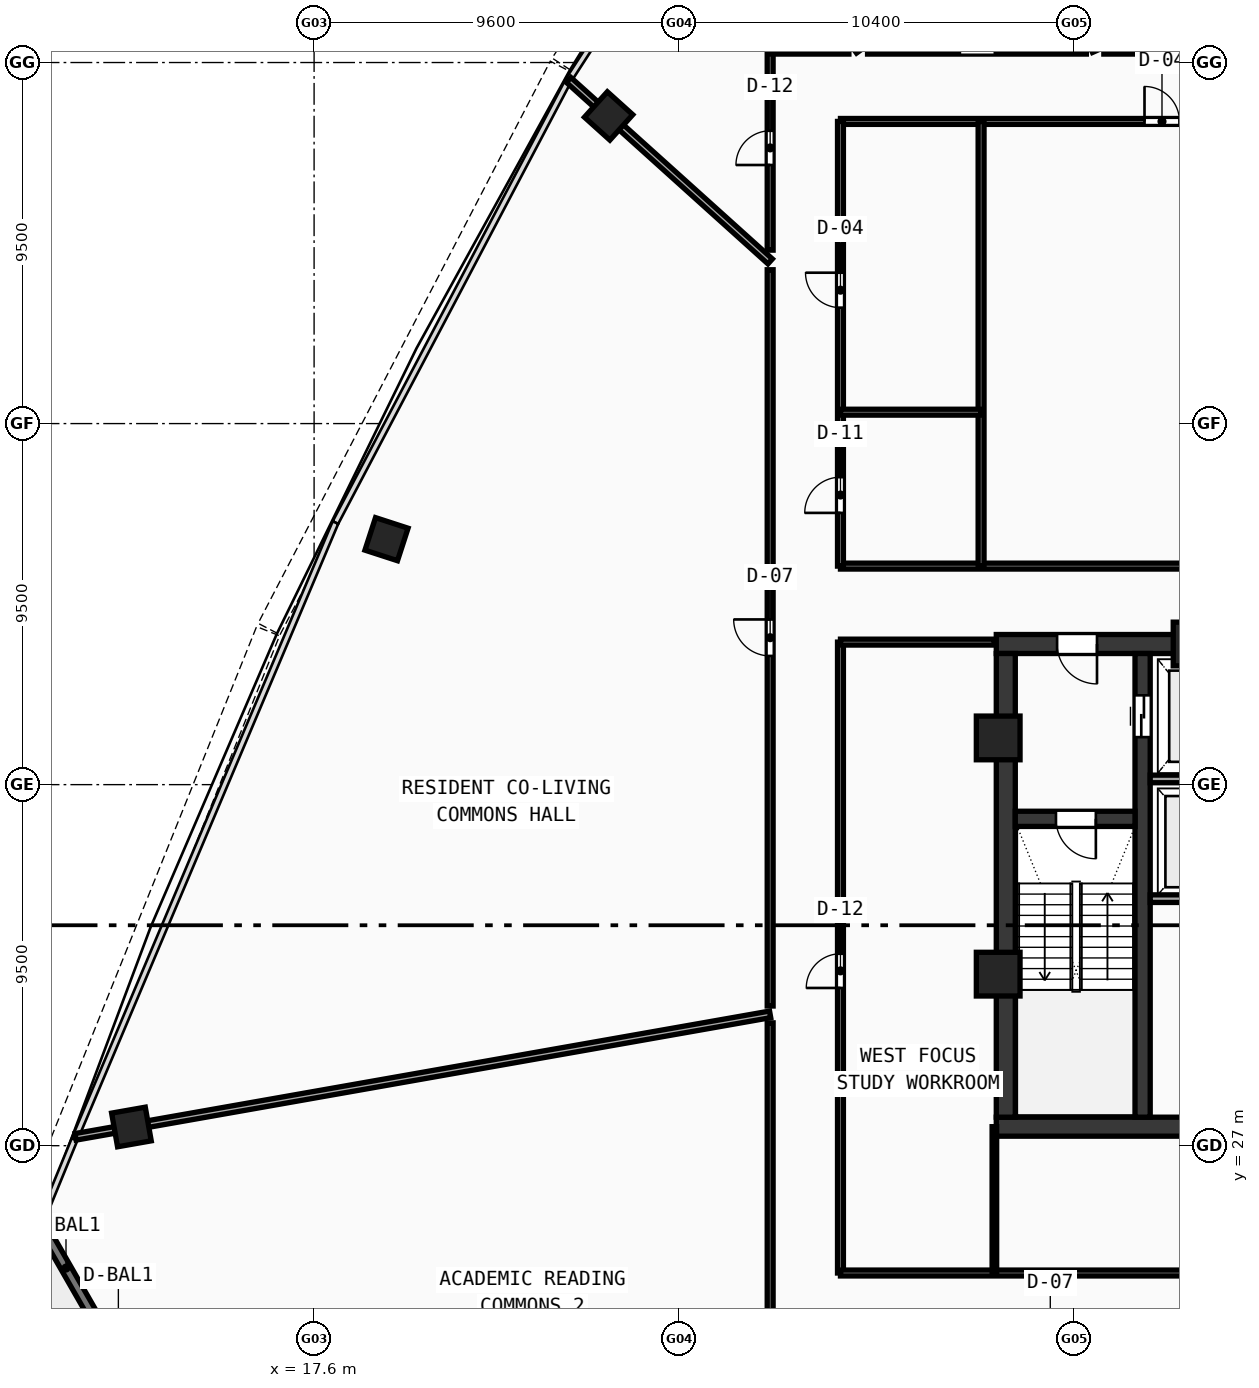
"""IFC4 building model, lengths in metres.
Left out: names, types, materials, properties, quantities, classifications, styles, units other than length and angle.
Written with IfcOpenShell. Run it as: python <this file> out.ifc"""

import sys

from ifc_helpers import new_model, si_unit, direction, frame, frame_2d, origin, origin_with_axes, origin_2d, place, context, subcontext, project, spatial, rectangle, hollow_rectangle, extrude, source, transform, mapped, element, fill, save


model = new_model("IFC4")
c1 = context("Model", 3, precision=1e-05, world=origin(), true_north=direction((0.0, 1.0)))
c2 = subcontext(c1, "Body", "Model", "MODEL_VIEW")
j1 = project(units=[si_unit("LENGTHUNIT", "METRE"), si_unit("PLANEANGLEUNIT", "RADIAN")], contexts=[c1])
p1 = place(None, origin())
s1 = spatial("IfcSite", under=j1, at=p1, CompositionType="ELEMENT")
p2 = place(p1, origin())
s2 = spatial("IfcBuilding", under=s1, at=p2, CompositionType="ELEMENT")
p3 = place(p2, frame((0.0, 0.0, 211.36)))
s3 = spatial("IfcBuildingStorey", under=s2, at=p3, CompositionType="ELEMENT", Elevation=211.36)
p4 = place(p3, frame((35.55, 27.5, 0.0), z_axis=(0.0, 0.0, 1.0), x_axis=(1.0, 0.0, 0.0)))
e1 = element("IfcWall", 1, at=p4, inside=s3, PredefinedType="SHEAR", context=c2, shape_type="SweptSolid", body=[
    extrude(rectangle(XDim=24.9, YDim=0.5, at=frame_2d((12.45, 0.0))), origin(), (0.0, 0.0, 1.0), 3.54),
])
p5 = place(p3, frame((35.55, 40.2, 0.0), z_axis=(0.0, 0.0, 1.0), x_axis=(1.0, 0.0, 0.0)))
e2 = element("IfcWall", 2, at=p5, inside=s3, PredefinedType="SHEAR", context=c2, shape_type="SweptSolid", body=[
    extrude(rectangle(XDim=11.25, YDim=0.5, at=frame_2d((5.625, 0.0))), origin(), (0.0, 0.0, 1.0), 3.54),
])
p6 = place(p5, frame((1.6, 0.0, 0.0)))
e3 = element("IfcOpeningElement", 3, at=p6, cuts=e2, PredefinedType="OPENING", context=c2, shape_type="SweptSolid", body=[
    extrude(rectangle(XDim=1.05, YDim=2.1, at=frame_2d((0.525, 1.05))), frame((0.0, 0.26, 0.0), z_axis=(0.0, -1.0, 0.0), x_axis=(1.0, 0.0, 0.0)), (0.0, 0.0, 1.0), 0.52),
])
p7 = place(p3, frame((35.8, 27.75, 0.0), z_axis=(0.0, 0.0, 1.0), x_axis=(0.0, 1.0, 0.0)))
e4 = element("IfcWall", 4, at=p7, inside=s3, PredefinedType="SHEAR", context=c2, shape_type="SweptSolid", body=[
    extrude(rectangle(XDim=12.2, YDim=0.5, at=frame_2d((6.1, 0.0))), origin(), (0.0, 0.0, 1.0), 3.54),
])
p8 = place(p3, frame((39.4, 27.75, 0.0), z_axis=(0.0, 0.0, 1.0), x_axis=(0.0, 1.0, 0.0)))
e5 = element("IfcWall", 5, at=p8, inside=s3, PredefinedType="SHEAR", context=c2, shape_type="SweptSolid", body=[
    extrude(rectangle(XDim=12.2, YDim=0.4, at=frame_2d((6.1, 0.0))), origin(), (0.0, 0.0, 1.0), 3.54),
])
p9 = place(p8, frame((10.0, 0.0, 0.0)))
e6 = element("IfcOpeningElement", 6, at=p9, cuts=e5, PredefinedType="OPENING", context=c2, shape_type="SweptSolid", body=[
    extrude(rectangle(XDim=1.1, YDim=2.1, at=frame_2d((0.55, 1.05))), frame((0.0, 0.21, 0.0), z_axis=(0.0, -1.0, 0.0), x_axis=(1.0, 0.0, 0.0)), (0.0, 0.0, 1.0), 0.42),
])
p10 = place(p3, frame((36.05, 35.6, 0.0), z_axis=(0.0, 0.0, 1.0), x_axis=(1.0, 0.0, 0.0)))
e7 = element("IfcWall", 7, at=p10, inside=s3, PredefinedType="SHEAR", context=c2, shape_type="SweptSolid", body=[
    extrude(rectangle(XDim=3.15, YDim=0.4, at=frame_2d((1.575, 0.0))), origin(), (0.0, 0.0, 1.0), 3.54),
])
p11 = place(p10, frame((1.07, 0.0, 0.0)))
e8 = element("IfcOpeningElement", 8, at=p11, cuts=e7, PredefinedType="OPENING", context=c2, shape_type="SweptSolid", body=[
    extrude(rectangle(XDim=1.05, YDim=2.1, at=frame_2d((0.525, 1.05))), frame((0.0, 0.21, 0.0), z_axis=(0.0, -1.0, 0.0), x_axis=(1.0, 0.0, 0.0)), (0.0, 0.0, 1.0), 0.42),
])
m1 = source(origin(), c2, "Body", "SweptSolid", [
    extrude(hollow_rectangle(XDim=1.15, YDim=1.15, WallThickness=0.048, at=origin_2d()), origin(), (0.0, 0.0, 1.0), 3.8),
])
for number, where, z_axis, x_axis in (
    (9, (40.781, 40.2, -0.26), (0.0, 0.0, 1.0), (1.0, 0.0, 0.0)),
    (10, (35.6, 37.729, -0.26), (0.0, 0.0, 1.0), (1.0, 0.0, 0.0)),
    (11, (35.6, 31.513, -0.26), (0.0, 0.0, 1.0), (1.0, 0.0, 0.0)),
):
    element("IfcColumn", number, at=place(p3, frame(where, z_axis=z_axis, x_axis=x_axis)), inside=s3, PredefinedType="COLUMN", context=c2, shape_type="MappedRepresentation", body=[
        mapped(m1, transform((0.0, 0.0, 0.0), scale=1.0)),
    ])
m2 = source(origin(), c2, "Body", "SweptSolid", [
    extrude(hollow_rectangle(XDim=0.9, YDim=0.9, WallThickness=0.036, at=origin_2d()), origin(), (0.0, 0.0, 1.0), 3.8),
])
for number, where, z_axis, x_axis in (
    (12, (25.349, 54.095, -0.26), (0.0, 0.0, 1.0), (-0.669, -0.743, 0.0)),
    (13, (19.505, 42.958, -0.26), (0.0, 0.0, 1.0), (-0.309, -0.951, 0.0)),
    (14, (12.793, 27.492, -0.26), (0.0, 0.0, 1.0), (0.174, -0.985, 0.0)),
):
    element("IfcColumn", number, at=place(p3, frame(where, z_axis=z_axis, x_axis=x_axis)), inside=s3, PredefinedType="COLUMN", context=c2, shape_type="MappedRepresentation", body=[
        mapped(m2, transform((0.0, 0.0, 0.0), scale=1.0)),
    ])
p12 = place(p3, frame((10.365, 25.01, 0.0), z_axis=(0.0, 0.0, 1.0), x_axis=(0.497934125263, -0.867214856249, 0.0)))
e15 = element("IfcWall", 15, at=p12, inside=s3, PredefinedType="STANDARD", context=c2, shape_type="SweptSolid", body=[
    extrude(rectangle(XDim=8.373, YDim=0.26, at=frame_2d((4.186, 0.0))), origin(), (0.0, 0.0, 1.0), 3.54),
])
p13 = place(p12, frame((3.286, 0.0, 0.0)))
e16 = element("IfcOpeningElement", 16, at=p13, cuts=e15, PredefinedType="OPENING", context=c2, shape_type="SweptSolid", body=[
    extrude(rectangle(XDim=1.8, YDim=2.15, at=frame_2d((0.9, 1.075))), frame((0.0, 0.14, 0.0), z_axis=(0.0, -1.0, 0.0), x_axis=(1.0, 0.0, 0.0)), (0.0, 0.0, 1.0), 0.28),
])
for number, where, z_axis, x_axis in (
    (17, (39.6, 36.65, 0.0), (0.0, 0.0, 1.0), (1.0, 0.0, 0.0)),
    (18, (39.6, 33.5, 0.0), (0.0, 0.0, 1.0), (1.0, 0.0, 0.0)),
):
    element("IfcWall", number, at=place(p3, frame(where, z_axis=z_axis, x_axis=x_axis)), inside=s3, PredefinedType="SOLIDWALL", context=c2, shape_type="SweptSolid", body=[
        extrude(rectangle(XDim=2.72, YDim=0.2, at=frame_2d((1.36, 0.0))), origin(), (0.0, 0.0, 1.0), 3.54),
    ])
p14 = place(p3, frame((31.45, 42.25, 0.0), z_axis=(0.0, 0.0, 1.0), x_axis=(1.0, 0.0, 0.0)))
e19 = element("IfcWall", 19, at=p14, inside=s3, PredefinedType="PARTITIONING", context=c2, shape_type="SweptSolid", body=[
    extrude(rectangle(XDim=33.1, YDim=0.155, at=frame_2d((16.55, 0.0))), origin(), (0.0, 0.0, 1.0), 2.89),
])
p15 = place(p3, frame((31.45, 53.95, 0.0), z_axis=(0.0, 0.0, 1.0), x_axis=(1.0, 0.0, 0.0)))
e20 = element("IfcWall", 20, at=p15, inside=s3, PredefinedType="PARTITIONING", context=c2, shape_type="SweptSolid", body=[
    extrude(rectangle(XDim=33.1, YDim=0.155, at=frame_2d((16.55, 0.0))), origin(), (0.0, 0.0, 1.0), 2.89),
])
p16 = place(p15, frame((8.0, 0.0, 0.0)))
e21 = element("IfcOpeningElement", 21, at=p16, cuts=e20, PredefinedType="OPENING", context=c2, shape_type="SweptSolid", body=[
    extrude(rectangle(XDim=0.92, YDim=2.1, at=frame_2d((0.46, 1.05))), frame((0.0, 0.087, 0.0), z_axis=(0.0, -1.0, 0.0), x_axis=(1.0, 0.0, 0.0)), (0.0, 0.0, 1.0), 0.175),
])
p17 = place(p15, frame((27.05, 0.0, 0.0)))
e22 = element("IfcOpeningElement", 22, at=p17, cuts=e20, PredefinedType="OPENING", context=c2, shape_type="SweptSolid", body=[
    extrude(rectangle(XDim=0.92, YDim=2.1, at=frame_2d((0.46, 1.05))), frame((0.0, 0.087, 0.0), z_axis=(0.0, -1.0, 0.0), x_axis=(1.0, 0.0, 0.0)), (0.0, 0.0, 1.0), 0.175),
])
p18 = place(p3, frame((31.45, 42.25, 0.0), z_axis=(0.0, 0.0, 1.0), x_axis=(0.0, 1.0, 0.0)))
e23 = element("IfcWall", 23, at=p18, inside=s3, PredefinedType="PARTITIONING", context=c2, shape_type="SweptSolid", body=[
    extrude(rectangle(XDim=11.7, YDim=0.155, at=frame_2d((5.85, 0.0))), origin(), (0.0, 0.0, 1.0), 2.89),
])
p19 = place(p18, frame((1.4, 0.0, 0.0)))
e24 = element("IfcOpeningElement", 24, at=p19, cuts=e23, PredefinedType="OPENING", context=c2, shape_type="SweptSolid", body=[
    extrude(rectangle(XDim=0.94, YDim=2.1, at=frame_2d((0.47, 1.05))), frame((0.0, 0.087, 0.0), z_axis=(0.0, -1.0, 0.0), x_axis=(1.0, 0.0, 0.0)), (0.0, 0.0, 1.0), 0.175),
])
p20 = place(p18, frame((6.8, 0.0, 0.0)))
e25 = element("IfcOpeningElement", 25, at=p20, cuts=e23, PredefinedType="OPENING", context=c2, shape_type="SweptSolid", body=[
    extrude(rectangle(XDim=0.92, YDim=2.1, at=frame_2d((0.46, 1.05))), frame((0.0, 0.087, 0.0), z_axis=(0.0, -1.0, 0.0), x_axis=(1.0, 0.0, 0.0)), (0.0, 0.0, 1.0), 0.175),
])
p21 = place(p3, frame((35.15, 42.25, 0.0), z_axis=(0.0, 0.0, 1.0), x_axis=(0.0, 1.0, 0.0)))
e26 = element("IfcWall", 26, at=p21, inside=s3, PredefinedType="PARTITIONING", context=c2, shape_type="SweptSolid", body=[
    extrude(rectangle(XDim=11.7, YDim=0.155, at=frame_2d((5.85, 0.0))), origin(), (0.0, 0.0, 1.0), 2.89),
])
p22 = place(p3, frame((31.45, 46.3, 0.0), z_axis=(0.0, 0.0, 1.0), x_axis=(1.0, 0.0, 0.0)))
e27 = element("IfcWall", 27, at=p22, inside=s3, PredefinedType="PARTITIONING", context=c2, shape_type="SweptSolid", body=[
    extrude(rectangle(XDim=3.7, YDim=0.155, at=frame_2d((1.85, 0.0))), origin(), (0.0, 0.0, 1.0), 2.89),
])
p23 = place(p3, frame((31.45, 23.65, 0.0), z_axis=(0.0, 0.0, 1.0), x_axis=(0.0, 1.0, 0.0)))
e28 = element("IfcWall", 28, at=p23, inside=s3, PredefinedType="PARTITIONING", context=c2, shape_type="SweptSolid", body=[
    extrude(rectangle(XDim=16.6, YDim=0.155, at=frame_2d((8.3, 0.0))), origin(), (0.0, 0.0, 1.0), 2.89),
])
p24 = place(p23, frame((7.5, 0.0, 0.0)))
e29 = element("IfcOpeningElement", 29, at=p24, cuts=e28, PredefinedType="OPENING", context=c2, shape_type="SweptSolid", body=[
    extrude(rectangle(XDim=0.9, YDim=2.08, at=frame_2d((0.45, 1.04))), frame((0.0, 0.087, 0.0), z_axis=(0.0, -1.0, 0.0), x_axis=(1.0, 0.0, 0.0)), (0.0, 0.0, 1.0), 0.175),
])
p25 = place(p3, frame((31.45, 23.65, 0.0), z_axis=(0.0, 0.0, 1.0), x_axis=(1.0, 0.0, 0.0)))
e30 = element("IfcWall", 30, at=p25, inside=s3, PredefinedType="PARTITIONING", context=c2, shape_type="SweptSolid", body=[
    extrude(rectangle(XDim=33.1, YDim=0.155, at=frame_2d((16.55, 0.0))), origin(), (0.0, 0.0, 1.0), 2.89),
])
p26 = place(p25, frame((16.0, 0.0, 0.0)))
e31 = element("IfcOpeningElement", 31, at=p26, cuts=e30, PredefinedType="OPENING", context=c2, shape_type="SweptSolid", body=[
    extrude(rectangle(XDim=0.92, YDim=2.1, at=frame_2d((0.46, 1.05))), frame((0.0, 0.087, 0.0), z_axis=(0.0, -1.0, 0.0), x_axis=(1.0, 0.0, 0.0)), (0.0, 0.0, 1.0), 0.175),
])
p27 = place(p3, frame((31.45, 40.25, 0.0), z_axis=(0.0, 0.0, 1.0), x_axis=(1.0, 0.0, 0.0)))
e32 = element("IfcWall", 32, at=p27, inside=s3, PredefinedType="PARTITIONING", context=c2, shape_type="SweptSolid", body=[
    extrude(rectangle(XDim=4.05, YDim=0.155, at=frame_2d((2.025, 0.0))), origin(), (0.0, 0.0, 1.0), 3.54),
])
p28 = place(p3, frame((35.5, 23.65, 0.0), z_axis=(0.0, 0.0, 1.0), x_axis=(0.0, 1.0, 0.0)))
e33 = element("IfcWall", 33, at=p28, inside=s3, PredefinedType="PARTITIONING", context=c2, shape_type="SweptSolid", body=[
    extrude(rectangle(XDim=3.85, YDim=0.12, at=frame_2d((1.925, 0.0))), origin(), (0.0, 0.0, 1.0), 3.14),
])
p29 = place(p3, frame((38.16, 55.8, 0.0), z_axis=(0.0, 0.0, 1.0), x_axis=(-0.406732574237, 0.913547269196, 0.0)))
e34 = element("IfcWall", 34, at=p29, inside=s3, PredefinedType="PARTITIONING", context=c2, shape_type="SweptSolid", body=[
    extrude(rectangle(XDim=13.419, YDim=0.175, at=frame_2d((6.709, 0.0))), origin(), (0.0, 0.0, 1.0), 2.89),
])
p30 = place(p3, frame((31.943, 55.8, 0.0), z_axis=(0.0, 0.0, 1.0), x_axis=(-0.587786531485, 0.809016064986, 0.0)))
e35 = element("IfcWall", 35, at=p30, inside=s3, PredefinedType="PARTITIONING", context=c2, shape_type="SweptSolid", body=[
    extrude(rectangle(XDim=6.446, YDim=0.175, at=frame_2d((3.223, 0.0))), origin(), (0.0, 0.0, 1.0), 2.89),
])
p31 = place(p3, frame((29.6, 50.267, 0.0), z_axis=(0.0, 0.0, 1.0), x_axis=(-0.743146095384, 0.669129195982, 0.0)))
e36 = element("IfcWall", 36, at=p31, inside=s3, PredefinedType="PARTITIONING", context=c2, shape_type="SweptSolid", body=[
    extrude(rectangle(XDim=7.135, YDim=0.175, at=frame_2d((3.567, 0.0))), origin(), (0.0, 0.0, 1.0), 2.89),
])
p32 = place(p3, frame((29.6, 30.456, 0.0), z_axis=(0.0, 0.0, 1.0), x_axis=(-0.984808051039, -0.173646487465, 0.0)))
e37 = element("IfcWall", 37, at=p32, inside=s3, PredefinedType="PARTITIONING", context=c2, shape_type="SweptSolid", body=[
    extrude(rectangle(XDim=18.557, YDim=0.175, at=frame_2d((9.279, 0.0))), origin(), (0.0, 0.0, 1.0), 2.89),
])
p33 = place(p3, frame((29.6, 21.8, 0.0), z_axis=(0.0, 0.0, 1.0), x_axis=(0.0, 1.0, 0.0)))
e38 = element("IfcWall", 38, at=p33, inside=s3, PredefinedType="PARTITIONING", context=c2, shape_type="SweptSolid", body=[
    extrude(rectangle(XDim=8.432, YDim=0.155, at=frame_2d((4.216, 0.0))), origin(), (0.0, 0.0, 1.0), 3.14),
])
p34 = place(p3, frame((29.6, 30.675, 0.0), z_axis=(0.0, 0.0, 1.0), x_axis=(0.0, 1.0, 0.0)))
e39 = element("IfcWall", 39, at=p34, inside=s3, PredefinedType="PARTITIONING", context=c2, shape_type="SweptSolid", body=[
    extrude(rectangle(XDim=19.372, YDim=0.155, at=frame_2d((9.686, 0.0))), origin(), (0.0, 0.0, 1.0), 2.89),
])
p35 = place(p34, frame((9.211, 0.0, 0.0)))
e40 = element("IfcOpeningElement", 40, at=p35, cuts=e39, PredefinedType="OPENING", context=c2, shape_type="SweptSolid", body=[
    extrude(rectangle(XDim=0.96, YDim=2.12, at=frame_2d((0.48, 1.06))), frame((0.0, 0.087, 0.0), z_axis=(0.0, -1.0, 0.0), x_axis=(1.0, 0.0, 0.0)), (0.0, 0.0, 1.0), 0.175),
])
p36 = place(p3, frame((29.6, 50.563, 0.0), z_axis=(0.0, 0.0, 1.0), x_axis=(0.0, 1.0, 0.0)))
e41 = element("IfcWall", 41, at=p36, inside=s3, PredefinedType="PARTITIONING", context=c2, shape_type="SweptSolid", body=[
    extrude(rectangle(XDim=5.237, YDim=0.155, at=frame_2d((2.618, 0.0))), origin(), (0.0, 0.0, 1.0), 3.54),
])
p37 = place(p36, frame((2.24, 0.0, 0.0)))
e42 = element("IfcOpeningElement", 42, at=p37, cuts=e41, PredefinedType="OPENING", context=c2, shape_type="SweptSolid", body=[
    extrude(rectangle(XDim=0.9, YDim=2.08, at=frame_2d((0.45, 1.04))), frame((0.0, 0.087, 0.0), z_axis=(0.0, -1.0, 0.0), x_axis=(1.0, 0.0, 0.0)), (0.0, 0.0, 1.0), 0.175),
])
p38 = place(p3, frame((29.6, 55.8, 0.0), z_axis=(0.0, 0.0, 1.0), x_axis=(1.0, 0.0, 0.0)))
e43 = element("IfcWall", 43, at=p38, inside=s3, PredefinedType="PARTITIONING", context=c2, shape_type="SweptSolid", body=[
    extrude(rectangle(XDim=2.071, YDim=0.155, at=frame_2d((1.036, 0.0))), origin(), (0.0, 0.0, 1.0), 3.54),
])
p39 = place(p3, frame((32.163, 55.8, 0.0), z_axis=(0.0, 0.0, 1.0), x_axis=(1.0, 0.0, 0.0)))
e44 = element("IfcWall", 44, at=p39, inside=s3, PredefinedType="PARTITIONING", context=c2, shape_type="SweptSolid", body=[
    extrude(rectangle(XDim=5.757, YDim=0.155, at=frame_2d((2.878, 0.0))), origin(), (0.0, 0.0, 1.0), 3.14),
])
p40 = place(p39, frame((2.429, 0.0, 0.0)))
e45 = element("IfcOpeningElement", 45, at=p40, cuts=e44, PredefinedType="OPENING", context=c2, shape_type="SweptSolid", body=[
    extrude(rectangle(XDim=0.92, YDim=2.1, at=frame_2d((0.46, 1.05))), frame((0.0, 0.087, 0.0), z_axis=(0.0, -1.0, 0.0), x_axis=(1.0, 0.0, 0.0)), (0.0, 0.0, 1.0), 0.175),
])
p41 = place(p3, frame((38.38, 55.8, 0.0), z_axis=(0.0, 0.0, 1.0), x_axis=(1.0, 0.0, 0.0)))
e46 = element("IfcWall", 46, at=p41, inside=s3, PredefinedType="PARTITIONING", context=c2, shape_type="SweptSolid", body=[
    extrude(rectangle(XDim=5.329, YDim=0.155, at=frame_2d((2.665, 0.0))), origin(), (0.0, 0.0, 1.0), 2.89),
])
p42 = place(p41, frame((2.13, 0.0, 0.0)))
e47 = element("IfcOpeningElement", 47, at=p42, cuts=e46, PredefinedType="OPENING", context=c2, shape_type="SweptSolid", body=[
    extrude(rectangle(XDim=0.92, YDim=2.1, at=frame_2d((0.46, 1.05))), frame((0.0, 0.087, 0.0), z_axis=(0.0, -1.0, 0.0), x_axis=(1.0, 0.0, 0.0)), (0.0, 0.0, 1.0), 0.175),
])
m3 = source(origin(), c2, "Body", "SweptSolid", [
    extrude(rectangle(XDim=1.05, YDim=2.1, at=frame_2d((0.525, 1.05))), frame((0.0, 0.025, 0.0), z_axis=(0.0, -1.0, 0.0), x_axis=(1.0, 0.0, 0.0)), (0.0, 0.0, 1.0), 0.05),
])
p43 = place(p11, frame((1.05, 0.0, 0.0), z_axis=(0.0, 0.0, 1.0), x_axis=(-1.0, 0.0, 0.0)))
e48 = element("IfcDoor", 48, at=p43, inside=s3, OperationType="SINGLE_SWING_LEFT", PredefinedType="DOOR", context=c2, shape_type="MappedRepresentation", body=[
    mapped(m3, transform((0.0, 0.0, 0.0), scale=1.0)),
])
fill(e8, e48)
p44 = place(p6, frame((1.05, 0.0, 0.0), z_axis=(0.0, 0.0, 1.0), x_axis=(-1.0, 0.0, 0.0)))
e49 = element("IfcDoor", 49, at=p44, inside=s3, OperationType="SINGLE_SWING_LEFT", PredefinedType="DOOR", context=c2, shape_type="MappedRepresentation", body=[
    mapped(m3, transform((0.0, 0.0, 0.0), scale=1.0)),
])
fill(e3, e49)
m4 = source(origin(), c2, "Body", "SweptSolid", [
    extrude(rectangle(XDim=1.1, YDim=2.1, at=frame_2d((0.55, 1.05))), frame((0.0, 0.025, 0.0), z_axis=(0.0, -1.0, 0.0), x_axis=(1.0, 0.0, 0.0)), (0.0, 0.0, 1.0), 0.05),
])
p45 = place(p9, frame((1.1, 0.0, 0.0), z_axis=(0.0, 0.0, 1.0), x_axis=(-1.0, 0.0, 0.0)))
e50 = element("IfcDoor", 50, at=p45, inside=s3, OperationType="DOUBLE_DOOR_SLIDING", PredefinedType="DOOR", context=c2, shape_type="MappedRepresentation", body=[
    mapped(m4, transform((0.0, 0.0, 0.0), scale=1.0)),
])
fill(e6, e50)
m5 = source(origin(), c2, "Body", "SweptSolid", [
    extrude(rectangle(XDim=0.94, YDim=2.1, at=frame_2d((0.47, 1.05))), frame((0.0, 0.025, 0.0), z_axis=(0.0, -1.0, 0.0), x_axis=(1.0, 0.0, 0.0)), (0.0, 0.0, 1.0), 0.05),
])
p46 = place(p19, origin_with_axes())
e51 = element("IfcDoor", 51, at=p46, inside=s3, OperationType="SINGLE_SWING_LEFT", PredefinedType="DOOR", context=c2, shape_type="MappedRepresentation", body=[
    mapped(m5, transform((0.0, 0.0, 0.0), scale=1.0)),
])
fill(e24, e51)
m6 = source(origin(), c2, "Body", "SweptSolid", [
    extrude(rectangle(XDim=0.92, YDim=2.1, at=frame_2d((0.46, 1.05))), frame((0.0, 0.025, 0.0), z_axis=(0.0, -1.0, 0.0), x_axis=(1.0, 0.0, 0.0)), (0.0, 0.0, 1.0), 0.05),
])
p47 = place(p20, origin_with_axes())
e52 = element("IfcDoor", 52, at=p47, inside=s3, OperationType="SINGLE_SWING_RIGHT", PredefinedType="DOOR", context=c2, shape_type="MappedRepresentation", body=[
    mapped(m6, transform((0.0, 0.0, 0.0), scale=1.0)),
])
fill(e25, e52)
p48 = place(p16, origin_with_axes())
e53 = element("IfcDoor", 53, at=p48, inside=s3, OperationType="SINGLE_SWING_LEFT", PredefinedType="DOOR", context=c2, shape_type="MappedRepresentation", body=[
    mapped(m6, transform((0.0, 0.0, 0.0), scale=1.0)),
])
fill(e21, e53)
m7 = source(origin(), c2, "Body", "SweptSolid", [
    extrude(rectangle(XDim=0.9, YDim=2.08, at=frame_2d((0.45, 1.04))), frame((0.0, 0.025, 0.0), z_axis=(0.0, -1.0, 0.0), x_axis=(1.0, 0.0, 0.0)), (0.0, 0.0, 1.0), 0.05),
])
p49 = place(p24, origin_with_axes())
e54 = element("IfcDoor", 54, at=p49, inside=s3, OperationType="SINGLE_SWING_LEFT", PredefinedType="DOOR", context=c2, shape_type="MappedRepresentation", body=[
    mapped(m7, transform((0.0, 0.0, 0.0), scale=1.0)),
])
fill(e29, e54)
p50 = place(p40, origin_with_axes())
e55 = element("IfcDoor", 55, at=p50, inside=s3, OperationType="SINGLE_SWING_RIGHT", PredefinedType="DOOR", context=c2, shape_type="MappedRepresentation", body=[
    mapped(m6, transform((0.0, 0.0, 0.0), scale=1.0)),
])
fill(e45, e55)
p51 = place(p37, origin_with_axes())
e56 = element("IfcDoor", 56, at=p51, inside=s3, OperationType="SINGLE_SWING_LEFT", PredefinedType="DOOR", context=c2, shape_type="MappedRepresentation", body=[
    mapped(m7, transform((0.0, 0.0, 0.0), scale=1.0)),
])
fill(e42, e56)
m8 = source(origin(), c2, "Body", "SweptSolid", [
    extrude(rectangle(XDim=0.96, YDim=2.12, at=frame_2d((0.48, 1.06))), frame((0.0, 0.025, 0.0), z_axis=(0.0, -1.0, 0.0), x_axis=(1.0, 0.0, 0.0)), (0.0, 0.0, 1.0), 0.05),
])
p52 = place(p35, origin_with_axes())
e57 = element("IfcDoor", 57, at=p52, inside=s3, OperationType="SINGLE_SWING_RIGHT", PredefinedType="DOOR", context=c2, shape_type="MappedRepresentation", body=[
    mapped(m8, transform((0.0, 0.0, 0.0), scale=1.0)),
])
fill(e40, e57)
save(model, sys.argv[1])
